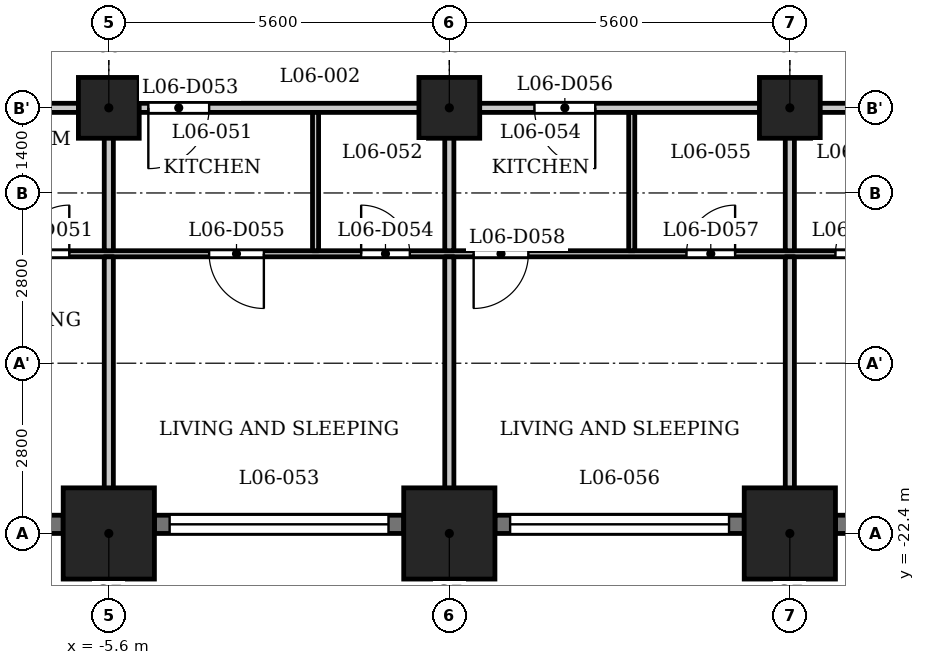
"""IFC4 building model, lengths in metres.
Left out: names, types, materials, properties, quantities, classifications, styles, units other than length and angle.
Written with IfcOpenShell. Run it as: python <this file> out.ifc"""

import sys

from ifc_helpers import new_model, si_unit, direction, frame, frame_2d, origin, origin_2d, place, context, subcontext, project, spatial, rectangle, extrude, element, fill, save


model = new_model("IFC4")
c1 = context("Model", 3, precision=1e-05, world=origin(), true_north=direction((0.0, 1.0)))
c2 = subcontext(c1, "Body", "Model", "MODEL_VIEW")
j1 = project(units=[si_unit("LENGTHUNIT", "METRE"), si_unit("PLANEANGLEUNIT", "RADIAN")], contexts=[c1])
p1 = place(None, origin())
s1 = spatial("IfcSite", under=j1, at=p1, CompositionType="ELEMENT")
p2 = place(p1, origin())
s2 = spatial("IfcBuilding", under=s1, at=p2, CompositionType="ELEMENT")
p3 = place(p2, frame((0.0, 0.0, 30.5)))
s3 = spatial("IfcBuildingStorey", under=s2, at=p3, CompositionType="ELEMENT", Elevation=30.5)
for number, where, z_axis, x_axis in (
    (1, (-5.6, -22.4, 0.0), (0.0, 0.0, 1.0), (1.0, 0.0, 0.0)),
    (2, (0.0, -22.4, 0.0), (0.0, 0.0, 1.0), (1.0, 0.0, 0.0)),
    (3, (5.6, -22.4, 0.0), (0.0, 0.0, 1.0), (1.0, 0.0, 0.0)),
):
    element("IfcColumn", number, at=place(p3, frame(where, z_axis=z_axis, x_axis=x_axis)), inside=s3, PredefinedType="COLUMN", context=c2, shape_type="SweptSolid", body=[
        extrude(rectangle(XDim=1.5, YDim=1.5, at=origin_2d()), origin(), (0.0, 0.0, 1.0), 3.5),
    ])
for number, where, z_axis, x_axis in (
    (4, (-5.6, -15.4, 0.0), (0.0, 0.0, 1.0), (1.0, 0.0, 0.0)),
    (5, (0.0, -15.4, 0.0), (0.0, 0.0, 1.0), (1.0, 0.0, 0.0)),
    (6, (5.6, -15.4, 0.0), (0.0, 0.0, 1.0), (1.0, 0.0, 0.0)),
):
    element("IfcColumn", number, at=place(p3, frame(where, z_axis=z_axis, x_axis=x_axis)), inside=s3, PredefinedType="COLUMN", context=c2, shape_type="SweptSolid", body=[
        extrude(rectangle(XDim=1.0, YDim=1.0, at=origin_2d()), origin(), (0.0, 0.0, 1.0), 3.5),
    ])
p4 = place(p3, frame((-10.45, -22.25, 0.0), z_axis=(0.0, 0.0, 1.0), x_axis=(1.0, 0.0, 0.0)))
e7 = element("IfcWall", 7, at=p4, inside=s3, PredefinedType="SOLIDWALL", context=c2, shape_type="SweptSolid", body=[
    extrude(rectangle(XDim=4.1, YDim=0.3, at=frame_2d((2.05, 0.0))), origin(), (0.0, 0.0, 1.0), 2.35),
])
p5 = place(p4, frame((0.85, 0.0, 0.0)))
e8 = element("IfcOpeningElement", 8, at=p5, cuts=e7, PredefinedType="OPENING", context=c2, shape_type="SweptSolid", body=[
    extrude(rectangle(XDim=2.4, YDim=2.3, at=frame_2d((1.2, 1.15))), frame((0.0, 0.16, 0.0), z_axis=(0.0, -1.0, 0.0), x_axis=(1.0, 0.0, 0.0)), (0.0, 0.0, 1.0), 0.32),
])
p6 = place(p3, frame((-4.85, -22.25, 0.0), z_axis=(0.0, 0.0, 1.0), x_axis=(1.0, 0.0, 0.0)))
e9 = element("IfcWall", 9, at=p6, inside=s3, PredefinedType="SOLIDWALL", context=c2, shape_type="SweptSolid", body=[
    extrude(rectangle(XDim=4.1, YDim=0.3, at=frame_2d((2.05, 0.0))), origin(), (0.0, 0.0, 1.0), 2.35),
])
p7 = place(p6, frame((0.25, 0.0, 1.2)))
e10 = element("IfcOpeningElement", 10, at=p7, cuts=e9, PredefinedType="OPENING", context=c2, shape_type="SweptSolid", body=[
    extrude(rectangle(XDim=3.6, YDim=0.95, at=frame_2d((1.8, 0.475))), frame((0.0, 0.16, 0.0), z_axis=(0.0, -1.0, 0.0), x_axis=(1.0, 0.0, 0.0)), (0.0, 0.0, 1.0), 0.32),
])
p8 = place(p3, frame((0.75, -22.25, 0.0), z_axis=(0.0, 0.0, 1.0), x_axis=(1.0, 0.0, 0.0)))
e11 = element("IfcWall", 11, at=p8, inside=s3, PredefinedType="SOLIDWALL", context=c2, shape_type="SweptSolid", body=[
    extrude(rectangle(XDim=4.1, YDim=0.3, at=frame_2d((2.05, 0.0))), origin(), (0.0, 0.0, 1.0), 2.35),
])
p9 = place(p8, frame((0.25, 0.0, 1.2)))
e12 = element("IfcOpeningElement", 12, at=p9, cuts=e11, PredefinedType="OPENING", context=c2, shape_type="SweptSolid", body=[
    extrude(rectangle(XDim=3.6, YDim=0.95, at=frame_2d((1.8, 0.475))), frame((0.0, 0.16, 0.0), z_axis=(0.0, -1.0, 0.0), x_axis=(1.0, 0.0, 0.0)), (0.0, 0.0, 1.0), 0.32),
])
p10 = place(p3, frame((6.35, -22.25, 0.0), z_axis=(0.0, 0.0, 1.0), x_axis=(1.0, 0.0, 0.0)))
e13 = element("IfcWall", 13, at=p10, inside=s3, PredefinedType="SOLIDWALL", context=c2, shape_type="SweptSolid", body=[
    extrude(rectangle(XDim=4.1, YDim=0.3, at=frame_2d((2.05, 0.0))), origin(), (0.0, 0.0, 1.0), 2.35),
])
p11 = place(p10, frame((0.85, 0.0, 0.0)))
e14 = element("IfcOpeningElement", 14, at=p11, cuts=e13, PredefinedType="OPENING", context=c2, shape_type="SweptSolid", body=[
    extrude(rectangle(XDim=2.4, YDim=2.3, at=frame_2d((1.2, 1.15))), frame((0.0, 0.16, 0.0), z_axis=(0.0, -1.0, 0.0), x_axis=(1.0, 0.0, 0.0)), (0.0, 0.0, 1.0), 0.32),
])
p12 = place(p3, frame((-26.394, -17.8, 0.0), z_axis=(0.0, 0.0, 1.0), x_axis=(1.0, 0.0, 0.0)))
e15 = element("IfcWall", 15, at=p12, inside=s3, PredefinedType="PARTITIONING", context=c2, shape_type="SweptSolid", body=[
    extrude(rectangle(XDim=53.126, YDim=0.1, at=frame_2d((26.563, 0.0))), origin(), (0.0, 0.0, 1.0), 3.2),
])
p13 = place(p12, frame((0.794, 0.0, 0.0)))
e16 = element("IfcOpeningElement", 16, at=p13, cuts=e15, PredefinedType="OPENING", context=c2, shape_type="SweptSolid", body=[
    extrude(rectangle(XDim=0.8, YDim=2.1, at=frame_2d((0.4, 1.05))), frame((0.0, 0.06, 0.0), z_axis=(0.0, -1.0, 0.0), x_axis=(1.0, 0.0, 0.0)), (0.0, 0.0, 1.0), 0.12),
])
p14 = place(p12, frame((5.644, 0.0, 0.0)))
e17 = element("IfcOpeningElement", 17, at=p14, cuts=e15, PredefinedType="OPENING", context=c2, shape_type="SweptSolid", body=[
    extrude(rectangle(XDim=0.9, YDim=2.1, at=frame_2d((0.45, 1.05))), frame((0.0, 0.06, 0.0), z_axis=(0.0, -1.0, 0.0), x_axis=(1.0, 0.0, 0.0)), (0.0, 0.0, 1.0), 0.12),
])
p15 = place(p12, frame((13.244, 0.0, 0.0)))
e18 = element("IfcOpeningElement", 18, at=p15, cuts=e15, PredefinedType="OPENING", context=c2, shape_type="SweptSolid", body=[
    extrude(rectangle(XDim=0.8, YDim=2.1, at=frame_2d((0.4, 1.05))), frame((0.0, 0.06, 0.0), z_axis=(0.0, -1.0, 0.0), x_axis=(1.0, 0.0, 0.0)), (0.0, 0.0, 1.0), 0.12),
])
p16 = place(p12, frame((11.494, 0.0, 0.0)))
e19 = element("IfcOpeningElement", 19, at=p16, cuts=e15, PredefinedType="OPENING", context=c2, shape_type="SweptSolid", body=[
    extrude(rectangle(XDim=0.9, YDim=2.1, at=frame_2d((0.45, 1.05))), frame((0.0, 0.06, 0.0), z_axis=(0.0, -1.0, 0.0), x_axis=(1.0, 0.0, 0.0)), (0.0, 0.0, 1.0), 0.12),
])
p17 = place(p12, frame((19.344, 0.0, 0.0)))
e20 = element("IfcOpeningElement", 20, at=p17, cuts=e15, PredefinedType="OPENING", context=c2, shape_type="SweptSolid", body=[
    extrude(rectangle(XDim=0.8, YDim=2.1, at=frame_2d((0.4, 1.05))), frame((0.0, 0.06, 0.0), z_axis=(0.0, -1.0, 0.0), x_axis=(1.0, 0.0, 0.0)), (0.0, 0.0, 1.0), 0.12),
])
p18 = place(p12, frame((16.094, 0.0, 0.0)))
e21 = element("IfcOpeningElement", 21, at=p18, cuts=e15, PredefinedType="OPENING", context=c2, shape_type="SweptSolid", body=[
    extrude(rectangle(XDim=0.9, YDim=2.1, at=frame_2d((0.45, 1.05))), frame((0.0, 0.06, 0.0), z_axis=(0.0, -1.0, 0.0), x_axis=(1.0, 0.0, 0.0)), (0.0, 0.0, 1.0), 0.12),
])
p19 = place(p12, frame((24.944, 0.0, 0.0)))
e22 = element("IfcOpeningElement", 22, at=p19, cuts=e15, PredefinedType="OPENING", context=c2, shape_type="SweptSolid", body=[
    extrude(rectangle(XDim=0.8, YDim=2.1, at=frame_2d((0.4, 1.05))), frame((0.0, 0.06, 0.0), z_axis=(0.0, -1.0, 0.0), x_axis=(1.0, 0.0, 0.0)), (0.0, 0.0, 1.0), 0.12),
])
p20 = place(p12, frame((22.444, 0.0, 0.0)))
e23 = element("IfcOpeningElement", 23, at=p20, cuts=e15, PredefinedType="OPENING", context=c2, shape_type="SweptSolid", body=[
    extrude(rectangle(XDim=0.9, YDim=2.1, at=frame_2d((0.45, 1.05))), frame((0.0, 0.06, 0.0), z_axis=(0.0, -1.0, 0.0), x_axis=(1.0, 0.0, 0.0)), (0.0, 0.0, 1.0), 0.12),
])
p21 = place(p12, frame((30.294, 0.0, 0.0)))
e24 = element("IfcOpeningElement", 24, at=p21, cuts=e15, PredefinedType="OPENING", context=c2, shape_type="SweptSolid", body=[
    extrude(rectangle(XDim=0.8, YDim=2.1, at=frame_2d((0.4, 1.05))), frame((0.0, 0.06, 0.0), z_axis=(0.0, -1.0, 0.0), x_axis=(1.0, 0.0, 0.0)), (0.0, 0.0, 1.0), 0.12),
])
p22 = place(p12, frame((26.794, 0.0, 0.0)))
e25 = element("IfcOpeningElement", 25, at=p22, cuts=e15, PredefinedType="OPENING", context=c2, shape_type="SweptSolid", body=[
    extrude(rectangle(XDim=0.9, YDim=2.1, at=frame_2d((0.45, 1.05))), frame((0.0, 0.06, 0.0), z_axis=(0.0, -1.0, 0.0), x_axis=(1.0, 0.0, 0.0)), (0.0, 0.0, 1.0), 0.12),
])
p23 = place(p12, frame((32.744, 0.0, 0.0)))
e26 = element("IfcOpeningElement", 26, at=p23, cuts=e15, PredefinedType="OPENING", context=c2, shape_type="SweptSolid", body=[
    extrude(rectangle(XDim=0.8, YDim=2.1, at=frame_2d((0.4, 1.05))), frame((0.0, 0.06, 0.0), z_axis=(0.0, -1.0, 0.0), x_axis=(1.0, 0.0, 0.0)), (0.0, 0.0, 1.0), 0.12),
])
p24 = place(p12, frame((35.594, 0.0, 0.0)))
e27 = element("IfcOpeningElement", 27, at=p24, cuts=e15, PredefinedType="OPENING", context=c2, shape_type="SweptSolid", body=[
    extrude(rectangle(XDim=0.9, YDim=2.1, at=frame_2d((0.45, 1.05))), frame((0.0, 0.06, 0.0), z_axis=(0.0, -1.0, 0.0), x_axis=(1.0, 0.0, 0.0)), (0.0, 0.0, 1.0), 0.12),
])
p25 = place(p12, frame((39.244, 0.0, 0.0)))
e28 = element("IfcOpeningElement", 28, at=p25, cuts=e15, PredefinedType="OPENING", context=c2, shape_type="SweptSolid", body=[
    extrude(rectangle(XDim=0.9, YDim=2.1, at=frame_2d((0.45, 1.05))), frame((0.0, 0.06, 0.0), z_axis=(0.0, -1.0, 0.0), x_axis=(1.0, 0.0, 0.0)), (0.0, 0.0, 1.0), 0.12),
])
p26 = place(p12, frame((41.544, 0.0, 0.0)))
e29 = element("IfcOpeningElement", 29, at=p26, cuts=e15, PredefinedType="OPENING", context=c2, shape_type="SweptSolid", body=[
    extrude(rectangle(XDim=0.9, YDim=2.1, at=frame_2d((0.45, 1.05))), frame((0.0, 0.06, 0.0), z_axis=(0.0, -1.0, 0.0), x_axis=(1.0, 0.0, 0.0)), (0.0, 0.0, 1.0), 0.12),
])
p27 = place(p12, frame((49.362, 0.0, 0.0)))
e30 = element("IfcOpeningElement", 30, at=p27, cuts=e15, PredefinedType="OPENING", context=c2, shape_type="SweptSolid", body=[
    extrude(rectangle(XDim=0.8, YDim=2.1, at=frame_2d((0.4, 1.05))), frame((0.0, 0.06, 0.0), z_axis=(0.0, -1.0, 0.0), x_axis=(1.0, 0.0, 0.0)), (0.0, 0.0, 1.0), 0.12),
])
p28 = place(p12, frame((45.094, 0.0, 0.0)))
e31 = element("IfcOpeningElement", 31, at=p28, cuts=e15, PredefinedType="OPENING", context=c2, shape_type="SweptSolid", body=[
    extrude(rectangle(XDim=0.9, YDim=2.1, at=frame_2d((0.45, 1.05))), frame((0.0, 0.06, 0.0), z_axis=(0.0, -1.0, 0.0), x_axis=(1.0, 0.0, 0.0)), (0.0, 0.0, 1.0), 0.12),
])
p29 = place(p3, frame((-27.484, -15.4, 0.0), z_axis=(0.0, 0.0, 1.0), x_axis=(1.0, 0.0, 0.0)))
e32 = element("IfcWall", 32, at=p29, inside=s3, PredefinedType="PARTITIONING", context=c2, shape_type="SweptSolid", body=[
    extrude(rectangle(XDim=54.968, YDim=0.15, at=frame_2d((27.484, 0.0))), origin(), (0.0, 0.0, 1.0), 3.2),
])
p30 = place(p29, frame((5.734, 0.0, 0.0)))
e33 = element("IfcOpeningElement", 33, at=p30, cuts=e32, PredefinedType="OPENING", context=c2, shape_type="SweptSolid", body=[
    extrude(rectangle(XDim=1.0, YDim=2.1, at=frame_2d((0.5, 1.05))), frame((0.0, 0.085, 0.0), z_axis=(0.0, -1.0, 0.0), x_axis=(1.0, 0.0, 0.0)), (0.0, 0.0, 1.0), 0.17),
])
p31 = place(p29, frame((11.584, 0.0, 0.0)))
e34 = element("IfcOpeningElement", 34, at=p31, cuts=e32, PredefinedType="OPENING", context=c2, shape_type="SweptSolid", body=[
    extrude(rectangle(XDim=1.0, YDim=2.1, at=frame_2d((0.5, 1.05))), frame((0.0, 0.085, 0.0), z_axis=(0.0, -1.0, 0.0), x_axis=(1.0, 0.0, 0.0)), (0.0, 0.0, 1.0), 0.17),
])
p32 = place(p29, frame((17.184, 0.0, 0.0)))
e35 = element("IfcOpeningElement", 35, at=p32, cuts=e32, PredefinedType="OPENING", context=c2, shape_type="SweptSolid", body=[
    extrude(rectangle(XDim=1.0, YDim=2.1, at=frame_2d((0.5, 1.05))), frame((0.0, 0.085, 0.0), z_axis=(0.0, -1.0, 0.0), x_axis=(1.0, 0.0, 0.0)), (0.0, 0.0, 1.0), 0.17),
])
p33 = place(p29, frame((22.534, 0.0, 0.0)))
e36 = element("IfcOpeningElement", 36, at=p33, cuts=e32, PredefinedType="OPENING", context=c2, shape_type="SweptSolid", body=[
    extrude(rectangle(XDim=1.0, YDim=2.1, at=frame_2d((0.5, 1.05))), frame((0.0, 0.085, 0.0), z_axis=(0.0, -1.0, 0.0), x_axis=(1.0, 0.0, 0.0)), (0.0, 0.0, 1.0), 0.17),
])
p34 = place(p29, frame((28.884, 0.0, 0.0)))
e37 = element("IfcOpeningElement", 37, at=p34, cuts=e32, PredefinedType="OPENING", context=c2, shape_type="SweptSolid", body=[
    extrude(rectangle(XDim=1.0, YDim=2.1, at=frame_2d((0.5, 1.05))), frame((0.0, 0.085, 0.0), z_axis=(0.0, -1.0, 0.0), x_axis=(1.0, 0.0, 0.0)), (0.0, 0.0, 1.0), 0.17),
])
p35 = place(p29, frame((39.334, 0.0, 0.0)))
e38 = element("IfcOpeningElement", 38, at=p35, cuts=e32, PredefinedType="OPENING", context=c2, shape_type="SweptSolid", body=[
    extrude(rectangle(XDim=1.0, YDim=2.1, at=frame_2d((0.5, 1.05))), frame((0.0, 0.085, 0.0), z_axis=(0.0, -1.0, 0.0), x_axis=(1.0, 0.0, 0.0)), (0.0, 0.0, 1.0), 0.17),
])
p36 = place(p29, frame((45.184, 0.0, 0.0)))
e39 = element("IfcOpeningElement", 39, at=p36, cuts=e32, PredefinedType="OPENING", context=c2, shape_type="SweptSolid", body=[
    extrude(rectangle(XDim=1.0, YDim=2.1, at=frame_2d((0.5, 1.05))), frame((0.0, 0.085, 0.0), z_axis=(0.0, -1.0, 0.0), x_axis=(1.0, 0.0, 0.0)), (0.0, 0.0, 1.0), 0.17),
])
p37 = place(p3, frame((-5.6, -23.13, 0.0), z_axis=(0.0, 0.0, 1.0), x_axis=(0.0, 1.0, 0.0)))
e40 = element("IfcWall", 40, at=p37, inside=s3, PredefinedType="PARTITIONING", context=c2, shape_type="SweptSolid", body=[
    extrude(rectangle(XDim=5.28, YDim=0.15, at=frame_2d((2.64, 0.0))), origin(), (0.0, 0.0, 1.0), 3.2),
])
p38 = place(p3, frame((-5.6, -17.75, 0.0), z_axis=(0.0, 0.0, 1.0), x_axis=(0.0, 1.0, 0.0)))
e41 = element("IfcWall", 41, at=p38, inside=s3, PredefinedType="PARTITIONING", context=c2, shape_type="SweptSolid", body=[
    extrude(rectangle(XDim=2.275, YDim=0.15, at=frame_2d((1.137, 0.0))), origin(), (0.0, 0.0, 1.0), 3.2),
])
p39 = place(p3, frame((-2.2, -17.75, 0.0), z_axis=(0.0, 0.0, 1.0), x_axis=(0.0, 1.0, 0.0)))
e42 = element("IfcWall", 42, at=p39, inside=s3, PredefinedType="PARTITIONING", context=c2, shape_type="SweptSolid", body=[
    extrude(rectangle(XDim=2.275, YDim=0.1, at=frame_2d((1.137, 0.0))), origin(), (0.0, 0.0, 1.0), 3.2),
])
p40 = place(p3, frame((0.0, -23.13, 0.0), z_axis=(0.0, 0.0, 1.0), x_axis=(0.0, 1.0, 0.0)))
e43 = element("IfcWall", 43, at=p40, inside=s3, PredefinedType="PARTITIONING", context=c2, shape_type="SweptSolid", body=[
    extrude(rectangle(XDim=5.28, YDim=0.15, at=frame_2d((2.64, 0.0))), origin(), (0.0, 0.0, 1.0), 3.2),
])
p41 = place(p3, frame((0.0, -17.75, 0.0), z_axis=(0.0, 0.0, 1.0), x_axis=(0.0, 1.0, 0.0)))
e44 = element("IfcWall", 44, at=p41, inside=s3, PredefinedType="PARTITIONING", context=c2, shape_type="SweptSolid", body=[
    extrude(rectangle(XDim=2.275, YDim=0.15, at=frame_2d((1.137, 0.0))), origin(), (0.0, 0.0, 1.0), 3.2),
])
p42 = place(p3, frame((3.0, -17.75, 0.0), z_axis=(0.0, 0.0, 1.0), x_axis=(0.0, 1.0, 0.0)))
e45 = element("IfcWall", 45, at=p42, inside=s3, PredefinedType="PARTITIONING", context=c2, shape_type="SweptSolid", body=[
    extrude(rectangle(XDim=2.275, YDim=0.1, at=frame_2d((1.137, 0.0))), origin(), (0.0, 0.0, 1.0), 3.2),
])
p43 = place(p3, frame((5.6, -23.13, 0.0), z_axis=(0.0, 0.0, 1.0), x_axis=(0.0, 1.0, 0.0)))
e46 = element("IfcWall", 46, at=p43, inside=s3, PredefinedType="PARTITIONING", context=c2, shape_type="SweptSolid", body=[
    extrude(rectangle(XDim=5.28, YDim=0.15, at=frame_2d((2.64, 0.0))), origin(), (0.0, 0.0, 1.0), 3.2),
])
p44 = place(p3, frame((5.6, -17.75, 0.0), z_axis=(0.0, 0.0, 1.0), x_axis=(0.0, 1.0, 0.0)))
e47 = element("IfcWall", 47, at=p44, inside=s3, PredefinedType="PARTITIONING", context=c2, shape_type="SweptSolid", body=[
    extrude(rectangle(XDim=2.275, YDim=0.15, at=frame_2d((1.137, 0.0))), origin(), (0.0, 0.0, 1.0), 3.2),
])
p45 = place(p17, origin())
e48 = element("IfcDoor", 48, at=p45, inside=s3, OperationType="SINGLE_SWING_LEFT", PredefinedType="DOOR", context=c2, shape_type="SweptSolid", body=[
    extrude(rectangle(XDim=0.8, YDim=2.1, at=frame_2d((0.4, 1.05))), frame((0.0, 0.025, 0.0), z_axis=(0.0, -1.0, 0.0), x_axis=(1.0, 0.0, 0.0)), (0.0, 0.0, 1.0), 0.05),
])
fill(e20, e48)
p46 = place(p33, origin())
e49 = element("IfcDoor", 49, at=p46, inside=s3, OperationType="SINGLE_SWING_LEFT", PredefinedType="DOOR", context=c2, shape_type="SweptSolid", body=[
    extrude(rectangle(XDim=1.0, YDim=2.1, at=frame_2d((0.5, 1.05))), frame((0.0, 0.025, 0.0), z_axis=(0.0, -1.0, 0.0), x_axis=(1.0, 0.0, 0.0)), (0.0, 0.0, 1.0), 0.05),
])
fill(e36, e49)
p47 = place(p19, origin())
e50 = element("IfcDoor", 50, at=p47, inside=s3, OperationType="SINGLE_SWING_RIGHT", PredefinedType="DOOR", context=c2, shape_type="SweptSolid", body=[
    extrude(rectangle(XDim=0.8, YDim=2.1, at=frame_2d((0.4, 1.05))), frame((0.0, 0.025, 0.0), z_axis=(0.0, -1.0, 0.0), x_axis=(1.0, 0.0, 0.0)), (0.0, 0.0, 1.0), 0.05),
])
fill(e22, e50)
p48 = place(p20, origin())
e51 = element("IfcDoor", 51, at=p48, inside=s3, OperationType="SINGLE_SWING_RIGHT", PredefinedType="DOOR", context=c2, shape_type="SweptSolid", body=[
    extrude(rectangle(XDim=0.9, YDim=2.1, at=frame_2d((0.45, 1.05))), frame((0.0, 0.025, 0.0), z_axis=(0.0, -1.0, 0.0), x_axis=(1.0, 0.0, 0.0)), (0.0, 0.0, 1.0), 0.05),
])
fill(e23, e51)
p49 = place(p34, origin())
e52 = element("IfcDoor", 52, at=p49, inside=s3, OperationType="SINGLE_SWING_RIGHT", PredefinedType="DOOR", context=c2, shape_type="SweptSolid", body=[
    extrude(rectangle(XDim=1.0, YDim=2.1, at=frame_2d((0.5, 1.05))), frame((0.0, 0.025, 0.0), z_axis=(0.0, -1.0, 0.0), x_axis=(1.0, 0.0, 0.0)), (0.0, 0.0, 1.0), 0.05),
])
fill(e37, e52)
p50 = place(p21, origin())
e53 = element("IfcDoor", 53, at=p50, inside=s3, OperationType="SINGLE_SWING_LEFT", PredefinedType="DOOR", context=c2, shape_type="SweptSolid", body=[
    extrude(rectangle(XDim=0.8, YDim=2.1, at=frame_2d((0.4, 1.05))), frame((0.0, 0.025, 0.0), z_axis=(0.0, -1.0, 0.0), x_axis=(1.0, 0.0, 0.0)), (0.0, 0.0, 1.0), 0.05),
])
fill(e24, e53)
p51 = place(p22, origin())
e54 = element("IfcDoor", 54, at=p51, inside=s3, OperationType="SINGLE_SWING_LEFT", PredefinedType="DOOR", context=c2, shape_type="SweptSolid", body=[
    extrude(rectangle(XDim=0.9, YDim=2.1, at=frame_2d((0.45, 1.05))), frame((0.0, 0.025, 0.0), z_axis=(0.0, -1.0, 0.0), x_axis=(1.0, 0.0, 0.0)), (0.0, 0.0, 1.0), 0.05),
])
fill(e25, e54)
p52 = place(p23, origin())
e55 = element("IfcDoor", 55, at=p52, inside=s3, OperationType="SINGLE_SWING_LEFT", PredefinedType="DOOR", context=c2, shape_type="SweptSolid", body=[
    extrude(rectangle(XDim=0.8, YDim=2.1, at=frame_2d((0.4, 1.05))), frame((0.0, 0.025, 0.0), z_axis=(0.0, -1.0, 0.0), x_axis=(1.0, 0.0, 0.0)), (0.0, 0.0, 1.0), 0.05),
])
fill(e26, e55)
p53 = place(p7, origin())
e56 = element("IfcWindow", 56, at=p53, inside=s3, PartitioningType="SINGLE_PANEL", PredefinedType="WINDOW", context=c2, shape_type="SweptSolid", body=[
    extrude(rectangle(XDim=3.6, YDim=0.95, at=frame_2d((1.8, 0.475))), frame((0.0, 0.03, 0.0), z_axis=(0.0, -1.0, 0.0), x_axis=(1.0, 0.0, 0.0)), (0.0, 0.0, 1.0), 0.06),
])
fill(e10, e56)
p54 = place(p9, origin())
e57 = element("IfcWindow", 57, at=p54, inside=s3, PartitioningType="SINGLE_PANEL", PredefinedType="WINDOW", context=c2, shape_type="SweptSolid", body=[
    extrude(rectangle(XDim=3.6, YDim=0.95, at=frame_2d((1.8, 0.475))), frame((0.0, 0.03, 0.0), z_axis=(0.0, -1.0, 0.0), x_axis=(1.0, 0.0, 0.0)), (0.0, 0.0, 1.0), 0.06),
])
fill(e12, e57)
save(model, sys.argv[1])
